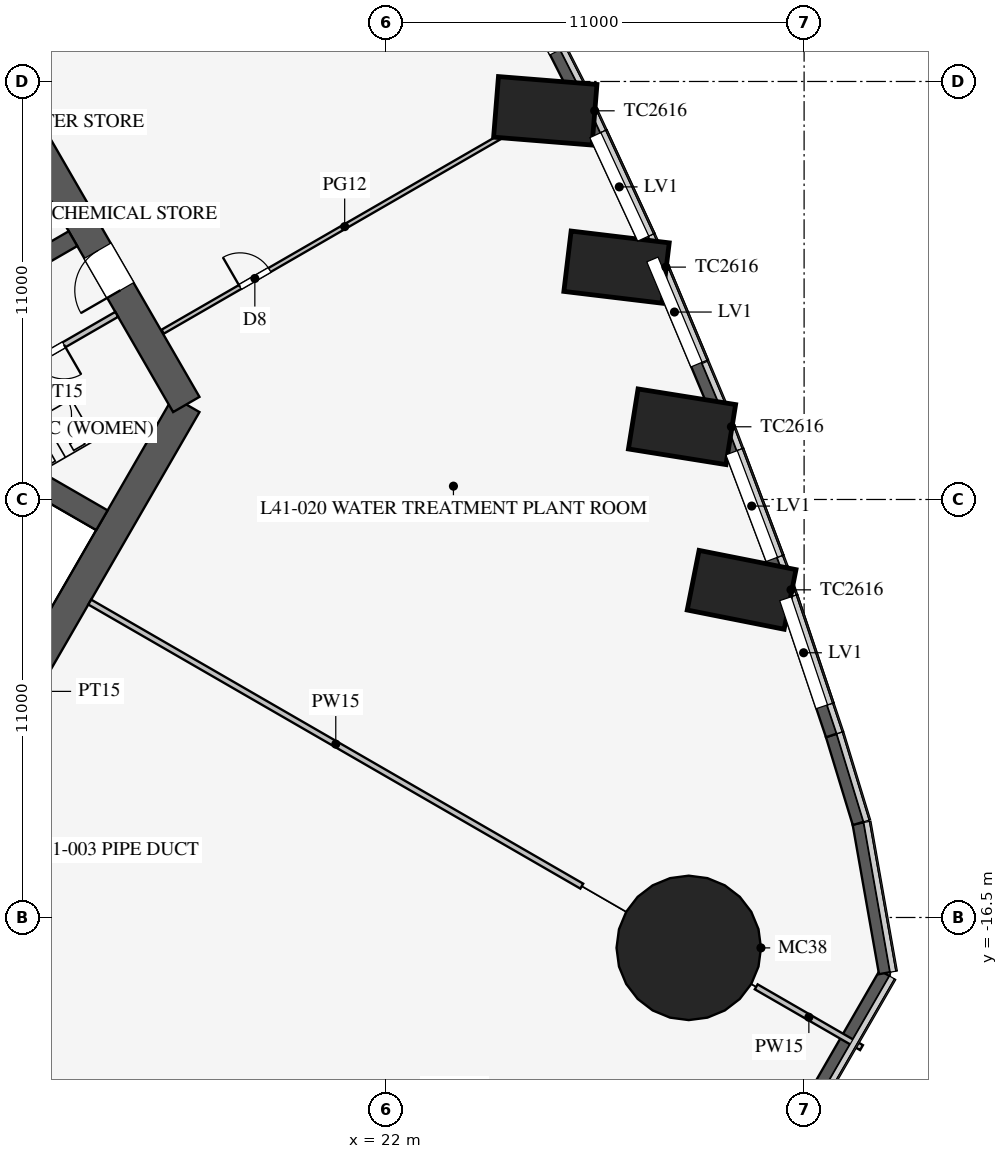
"""IFC4 building model, lengths in metres.
Left out: names, types, materials, properties, quantities, classifications, styles, units other than length and angle.
Written with IfcOpenShell. Run it as: python <this file> out.ifc"""

import sys

from ifc_helpers import new_model, si_unit, direction, frame, frame_2d, origin, origin_2d, place, context, subcontext, project, spatial, polyline, rectangle, circle, outline, extrude, clip, halfspace, element, fill, save


model = new_model("IFC4")
c1 = context("Model", 3, precision=1e-05, world=origin(), true_north=direction((0.0, 1.0)))
c2 = subcontext(c1, "Body", "Model", "MODEL_VIEW")
j1 = project(units=[si_unit("LENGTHUNIT", "METRE"), si_unit("PLANEANGLEUNIT", "RADIAN")], contexts=[c1])
p1 = place(None, origin())
s1 = spatial("IfcSite", under=j1, at=p1, CompositionType="ELEMENT")
p2 = place(p1, origin())
s2 = spatial("IfcBuilding", under=s1, at=p2, CompositionType="ELEMENT")
p3 = place(p2, frame((0.0, 0.0, 178.7)))
s3 = spatial("IfcBuildingStorey", under=s2, at=p3, CompositionType="ELEMENT", Elevation=178.7)
p4 = place(p3, frame((31.682, -7.689, 0.0), z_axis=(-0.259194268696, -0.149669548506, 0.954157931018), x_axis=(-0.329569843621, 0.942330239271, 0.058287548681)))
e1 = element("IfcColumn", 1, at=p4, inside=s3, PredefinedType="COLUMN", context=c2, shape_type="Clipping", body=[
    clip(clip(extrude(rectangle(XDim=2.6, YDim=1.6, at=origin_2d()), origin(), (0.0, 0.0, 1.0), 6.288), halfspace(frame((0.0, 0.0, 0.327), z_axis=(2.1547173570279913e-05, -3.2802665639875003e-06, 0.9999999997624797), x_axis=(0.0, 0.99999999999462, 3.2802665647489825e-06)), True)), halfspace(frame((0.0, 0.0, 5.962), z_axis=(-2.1547173570279913e-05, 3.2802665639875003e-06, -0.9999999997624797), x_axis=(0.0, -0.99999999999462, -3.2802665647489825e-06)), True)),
])
p5 = place(p3, frame((30.077, -3.42, 0.0), z_axis=(-0.231966146532, -0.13391860006, 0.963461216355), x_axis=(-0.36168243427, 0.93133790261, 0.042373669911)))
e2 = element("IfcColumn", 2, at=p5, inside=s3, PredefinedType="COLUMN", context=c2, shape_type="Clipping", body=[
    clip(clip(extrude(rectangle(XDim=2.6, YDim=1.6, at=origin_2d()), origin(), (0.0, 0.0, 1.0), 6.228), halfspace(frame((0.0, 0.0, 0.278), z_axis=(-6.917197328398794e-06, 4.213036003897219e-06, 0.9999999999672015), x_axis=(0.0, 0.9999999999911252, -4.213036003998011e-06)), True)), halfspace(frame((0.0, 0.0, 5.95), z_axis=(6.917197328398794e-06, -4.213036003897219e-06, -0.9999999999672015), x_axis=(0.0, -0.9999999999911252, 4.213036003998011e-06)), True)),
])
p6 = place(p3, frame((28.325, 0.765, 0.0), z_axis=(-0.210679538915, -0.121600535668, 0.969962598046), x_axis=(-0.396030042984, 0.91777825869, 0.029039162011)))
e3 = element("IfcColumn", 3, at=p6, inside=s3, PredefinedType="COLUMN", context=c2, shape_type="Clipping", body=[
    clip(clip(extrude(rectangle(XDim=2.6, YDim=1.6, at=origin_2d()), origin(), (0.0, 0.0, 1.0), 6.186), halfspace(frame((0.0, 0.0, 0.239), z_axis=(-3.0378180671815358e-05, -3.820048547931165e-06, 0.9999999995312867), x_axis=(0.0, 0.9999999999927036, 3.8200485496938e-06)), True)), halfspace(frame((0.0, 0.0, 5.947), z_axis=(3.0378180671815358e-05, 3.820048547931165e-06, -0.9999999995312867), x_axis=(0.0, -0.9999999999927036, -3.8200485496938e-06)), True)),
])
p7 = place(p3, frame((26.43, 4.867, 0.0), z_axis=(-0.195428167391, -0.112817153021, 0.974207432416), x_axis=(-0.430939361595, 0.902200723906, 0.018031095686)))
e4 = element("IfcColumn", 4, at=p7, inside=s3, PredefinedType="COLUMN", context=c2, shape_type="Clipping", body=[
    clip(clip(extrude(rectangle(XDim=2.6, YDim=1.6, at=origin_2d()), origin(), (0.0, 0.0, 1.0), 6.159), halfspace(frame((0.0, 0.0, 0.21), z_axis=(-1.266096880684145e-05, 1.3217046998748039e-05, 0.9999999998325048), x_axis=(0.0, 0.9999999999126549, -1.3217046999807387e-05)), True)), halfspace(frame((0.0, 0.0, 5.949), z_axis=(1.266096880684145e-05, -1.3217046998748039e-05, -0.9999999998325048), x_axis=(0.0, -0.9999999999126549, 1.3217046999807387e-05)), True)),
])
p8 = place(p3, frame((30.311, -17.5, 0.0), z_axis=(-0.273844135475, 0.158114685496, 0.948688112973), x_axis=(-0.50002537861, -0.866010750942, 0.0)))
e5 = element("IfcColumn", 5, at=p8, inside=s3, PredefinedType="COLUMN", context=c2, shape_type="Clipping", body=[
    clip(clip(extrude(circle(Radius=1.9, at=origin_2d()), origin(), (0.0, 0.0, 1.0), 6.324), halfspace(frame((0.0, 0.0, 0.634), z_axis=(9.267167373067098e-06, -1.5226556625558274e-05, 0.9999999998411359), x_axis=(0.0, 0.9999999998840761, 1.5226556626212106e-05)), True)), halfspace(frame((0.0, 0.0, 5.69), z_axis=(-9.267167373067098e-06, 1.5226556625558274e-05, -0.9999999998411359), x_axis=(0.0, -0.9999999998840761, -1.5226556626212106e-05)), True)),
])
p9 = place(p3, frame((10.97, -13.0, 0.0), z_axis=(0.0, 0.0, 1.0), x_axis=(0.499995765644, 0.866027848477, 0.0)))
e6 = element("IfcWall", 6, at=p9, inside=s3, PredefinedType="SHEAR", context=c2, shape_type="SweptSolid", body=[
    extrude(rectangle(XDim=11.547, YDim=0.8, at=frame_2d((5.773, 0.0))), origin(), (0.0, 0.0, 1.0), 6.0),
])
p10 = place(p3, frame((16.743, -3.0, 0.0), z_axis=(0.0, 0.0, 1.0), x_axis=(-0.500002442456, 0.866023993627, 0.0)))
e7 = element("IfcWall", 7, at=p10, inside=s3, PredefinedType="SHEAR", context=c2, shape_type="SweptSolid", body=[
    extrude(rectangle(XDim=21.939, YDim=0.8, at=frame_2d((10.97, 0.0))), origin(), (0.0, 0.0, 1.0), 6.0),
])
p11 = place(p10, frame((17.27, 0.0, 0.0)))
e8 = element("IfcOpeningElement", 8, at=p11, cuts=e7, PredefinedType="OPENING", context=c2, shape_type="SweptSolid", body=[
    extrude(rectangle(XDim=1.2, YDim=2.1, at=frame_2d((0.6, 1.05))), frame((0.0, 0.41, 0.0), z_axis=(0.0, -1.0, 0.0), x_axis=(1.0, 0.0, 0.0)), (0.0, 0.0, 1.0), 0.82),
])
p12 = place(p10, frame((3.47, 0.0, 0.0)))
e9 = element("IfcOpeningElement", 9, at=p12, cuts=e7, PredefinedType="OPENING", context=c2, shape_type="SweptSolid", body=[
    extrude(rectangle(XDim=1.2, YDim=2.1, at=frame_2d((0.6, 1.05))), frame((0.0, 0.41, 0.0), z_axis=(0.0, -1.0, 0.0), x_axis=(1.0, 0.0, 0.0)), (0.0, 0.0, 1.0), 0.82),
])
p13 = place(p3, frame((11.532, 0.076, 0.0), z_axis=(0.0, 0.0, 1.0), x_axis=(0.866005588531, 0.500034319456, 0.0)))
e10 = element("IfcWall", 10, at=p13, inside=s3, PredefinedType="SHEAR", context=c2, shape_type="SweptSolid", body=[
    extrude(rectangle(XDim=2.575, YDim=0.45, at=frame_2d((1.288, 0.0))), origin(), (0.0, 0.0, 1.0), 6.0),
])
p14 = place(p3, frame((6.663, -1.509, 0.0), z_axis=(0.0, 0.0, 1.0), x_axis=(0.866019375473, -0.500010441196, 0.0)))
e11 = element("IfcWall", 11, at=p14, inside=s3, PredefinedType="SHEAR", context=c2, shape_type="SweptSolid", body=[
    extrude(rectangle(XDim=9.075, YDim=0.6, at=frame_2d((4.538, 0.0))), origin(), (0.0, 0.0, 1.0), 6.0),
])
for number, where, z_axis, x_axis in (
    (12, (33.118, -21.431, 0.0), (0.0, 0.0, 1.0), (0.5, 0.866, 0.0)),
    (13, (35.119, -17.966, 0.0), (0.0, 0.0, 1.0), (-0.174, 0.985, 0.0)),
):
    element("IfcWall", number, at=place(p3, frame(where, z_axis=z_axis, x_axis=x_axis)), inside=s3, PredefinedType="SOLIDWALL", context=c2, shape_type="SweptSolid", body=[
        extrude(rectangle(XDim=4.002, YDim=0.3, at=frame_2d((2.001, 0.0))), origin(), (0.0, 0.0, 1.0), 5.8),
    ])
p15 = place(p3, frame((34.424, -14.025, 0.0), z_axis=(0.0, 0.0, 1.0), x_axis=(-0.291639268075, 0.956528377685, 0.0)))
e14 = element("IfcWall", 14, at=p15, inside=s3, PredefinedType="SOLIDWALL", context=c2, shape_type="SweptSolid", body=[
    extrude(rectangle(XDim=2.42, YDim=0.3, at=frame_2d((1.21, 0.0))), origin(), (0.0, 0.0, 1.0), 5.8),
])
p16 = place(p3, frame((33.718, -11.71, 0.0), z_axis=(0.0, 0.0, 1.0), x_axis=(-0.318380687167, 0.947962941279, 0.0)))
e15 = element("IfcWall", 15, at=p16, inside=s3, PredefinedType="SOLIDWALL", context=c2, shape_type="SweptSolid", body=[
    extrude(rectangle(XDim=4.591, YDim=0.3, at=frame_2d((2.295, 0.0))), origin(), (0.0, 0.0, 1.0), 5.8),
])
p17 = place(p16, frame((0.796, 0.0, 3.5)))
e16 = element("IfcOpeningElement", 16, at=p17, cuts=e15, PredefinedType="OPENING", context=c2, shape_type="SweptSolid", body=[
    extrude(rectangle(XDim=3.0, YDim=2.0, at=frame_2d((1.5, 1.0))), frame((0.0, 0.16, 0.0), z_axis=(0.0, -1.0, 0.0), x_axis=(1.0, 0.0, 0.0)), (0.0, 0.0, 1.0), 0.32),
])
p18 = place(p3, frame((32.256, -7.358, 0.0), z_axis=(0.0, 0.0, 1.0), x_axis=(-0.352941426142, 0.935645418795, 0.0)))
e17 = element("IfcWall", 17, at=p18, inside=s3, PredefinedType="SOLIDWALL", context=c2, shape_type="SweptSolid", body=[
    extrude(rectangle(XDim=4.561, YDim=0.3, at=frame_2d((2.28, 0.0))), origin(), (0.0, 0.0, 1.0), 5.8),
])
p19 = place(p18, frame((0.3, 0.0, 3.5)))
e18 = element("IfcOpeningElement", 18, at=p19, cuts=e17, PredefinedType="OPENING", context=c2, shape_type="SweptSolid", body=[
    extrude(rectangle(XDim=3.0, YDim=2.0, at=frame_2d((1.5, 1.0))), frame((0.0, 0.16, 0.0), z_axis=(0.0, -1.0, 0.0), x_axis=(1.0, 0.0, 0.0)), (0.0, 0.0, 1.0), 0.32),
])
p20 = place(p3, frame((30.647, -3.091, 0.0), z_axis=(0.0, 0.0, 1.0), x_axis=(-0.386762112496, 0.922179520667, 0.0)))
e19 = element("IfcWall", 19, at=p20, inside=s3, PredefinedType="SOLIDWALL", context=c2, shape_type="SweptSolid", body=[
    extrude(rectangle(XDim=4.536, YDim=0.3, at=frame_2d((2.268, 0.0))), origin(), (0.0, 0.0, 1.0), 5.8),
])
p21 = place(p20, frame((1.236, 0.0, 3.5)))
e20 = element("IfcOpeningElement", 20, at=p21, cuts=e19, PredefinedType="OPENING", context=c2, shape_type="SweptSolid", body=[
    extrude(rectangle(XDim=3.0, YDim=2.0, at=frame_2d((1.5, 1.0))), frame((0.0, 0.16, 0.0), z_axis=(0.0, -1.0, 0.0), x_axis=(1.0, 0.0, 0.0)), (0.0, 0.0, 1.0), 0.32),
])
p22 = place(p3, frame((28.892, 1.093, 0.0), z_axis=(0.0, 0.0, 1.0), x_axis=(-0.419948870618, 0.907547765171, 0.0)))
e21 = element("IfcWall", 21, at=p22, inside=s3, PredefinedType="SOLIDWALL", context=c2, shape_type="SweptSolid", body=[
    extrude(rectangle(XDim=4.518, YDim=0.3, at=frame_2d((2.259, 0.0))), origin(), (0.0, 0.0, 1.0), 5.8),
])
p23 = place(p22, frame((0.3, 0.0, 3.5)))
e22 = element("IfcOpeningElement", 22, at=p23, cuts=e21, PredefinedType="OPENING", context=c2, shape_type="SweptSolid", body=[
    extrude(rectangle(XDim=3.0, YDim=2.0, at=frame_2d((1.5, 1.0))), frame((0.0, 0.16, 0.0), z_axis=(0.0, -1.0, 0.0), x_axis=(1.0, 0.0, 0.0)), (0.0, 0.0, 1.0), 0.32),
])
p24 = place(p3, frame((26.995, 5.193, 0.0), z_axis=(0.0, 0.0, 1.0), x_axis=(-0.452406735601, 0.891811720927, 0.0)))
e23 = element("IfcWall", 23, at=p24, inside=s3, PredefinedType="SOLIDWALL", context=c2, shape_type="SweptSolid", body=[
    extrude(rectangle(XDim=4.507, YDim=0.3, at=frame_2d((2.253, 0.0))), origin(), (0.0, 0.0, 1.0), 5.8),
])
p25 = place(p24, frame((1.207, 0.0, 3.5)))
e24 = element("IfcOpeningElement", 24, at=p25, cuts=e23, PredefinedType="OPENING", context=c2, shape_type="SweptSolid", body=[
    extrude(rectangle(XDim=3.0, YDim=2.0, at=frame_2d((1.5, 1.0))), frame((0.0, 0.16, 0.0), z_axis=(0.0, -1.0, 0.0), x_axis=(1.0, 0.0, 0.0)), (0.0, 0.0, 1.0), 0.32),
])
p26 = place(p3, frame((10.495, -3.178, 0.0), z_axis=(0.0, 0.0, 1.0), x_axis=(0.86602216432, 0.500005610874, 0.0)))
e25 = element("IfcWall", 25, at=p26, inside=s3, PredefinedType="PARTITIONING", context=c2, shape_type="SweptSolid", body=[
    extrude(rectangle(XDim=5.1, YDim=0.15, at=frame_2d((2.55, 0.0))), origin(), (0.0, 0.0, 1.0), 5.8),
])
p27 = place(p26, frame((2.6, 0.0, 0.0)))
e26 = element("IfcOpeningElement", 26, at=p27, cuts=e25, PredefinedType="OPENING", context=c2, shape_type="SweptSolid", body=[
    extrude(rectangle(XDim=0.9, YDim=2.1, at=frame_2d((0.45, 1.05))), frame((0.0, 0.085, 0.0), z_axis=(0.0, -1.0, 0.0), x_axis=(1.0, 0.0, 0.0)), (0.0, 0.0, 1.0), 0.17),
])
p28 = place(p3, frame((14.203, -8.2, 0.0), z_axis=(0.0, 0.0, 1.0), x_axis=(0.866021600284, -0.500006587798, 0.0)))
e27 = element("IfcWall", 27, at=p28, inside=s3, PredefinedType="PARTITIONING", context=c2, shape_type="SweptSolid", body=[
    extrude(rectangle(XDim=14.95, YDim=0.15, at=frame_2d((7.475, 0.0))), origin(), (0.0, 0.0, 1.0), 4.2),
])
p29 = place(p3, frame((31.74, -18.325, 0.0), z_axis=(0.0, 0.0, 1.0), x_axis=(0.866036909293, -0.499980071345, 0.0)))
e28 = element("IfcWall", 28, at=p29, inside=s3, PredefinedType="PARTITIONING", context=c2, shape_type="SweptSolid", body=[
    extrude(rectangle(XDim=3.199, YDim=0.15, at=frame_2d((1.6, 0.0))), origin(), (0.0, 0.0, 1.0), 5.8),
])
p30 = place(p3, frame((25.122, 4.112, 0.0), z_axis=(0.0, 0.0, 1.0), x_axis=(0.866002566612, 0.500039553057, 0.0)))
e29 = element("IfcWall", 29, at=p30, inside=s3, PredefinedType="PARTITIONING", context=c2, shape_type="SweptSolid", body=[
    extrude(outline(polyline([(0.0, 0.0), (0.667, 0.0), (0.667, 0.05), (0.0, 2.9), (0.0, 0.0)])), frame((0.0, 0.06, 0.0), z_axis=(0.0, -1.0, 0.0), x_axis=(1.0, 0.0, 0.0)), (0.0, 0.0, 1.0), 0.12),
])
p31 = place(p3, frame((16.122, -1.084, 0.0), z_axis=(0.0, 0.0, 1.0), x_axis=(0.866025583565, 0.49999968861, 0.0)))
e30 = element("IfcWall", 30, at=p31, inside=s3, PredefinedType="PARTITIONING", context=c2, shape_type="SweptSolid", body=[
    extrude(rectangle(XDim=10.393, YDim=0.12, at=frame_2d((5.196, 0.0))), origin(), (0.0, 0.0, 1.0), 2.9),
])
p32 = place(p31, frame((2.35, 0.0, 0.0)))
e31 = element("IfcOpeningElement", 31, at=p32, cuts=e30, PredefinedType="OPENING", context=c2, shape_type="SweptSolid", body=[
    extrude(rectangle(XDim=0.9, YDim=2.1, at=frame_2d((0.45, 1.05))), frame((0.0, 0.07, 0.0), z_axis=(0.0, -1.0, 0.0), x_axis=(1.0, 0.0, 0.0)), (0.0, 0.0, 1.0), 0.14),
])
p33 = place(p17, origin())
e32 = element("IfcWindow", 32, at=p33, inside=s3, PartitioningType="SINGLE_PANEL", PredefinedType="USERDEFINED", context=c2, shape_type="SweptSolid", body=[
    extrude(rectangle(XDim=3.0, YDim=2.0, at=frame_2d((1.5, 1.0))), frame((0.0, 0.03, 0.0), z_axis=(0.0, -1.0, 0.0), x_axis=(1.0, 0.0, 0.0)), (0.0, 0.0, 1.0), 0.06),
])
fill(e16, e32)
p34 = place(p19, origin())
e33 = element("IfcWindow", 33, at=p34, inside=s3, PartitioningType="SINGLE_PANEL", PredefinedType="USERDEFINED", context=c2, shape_type="SweptSolid", body=[
    extrude(rectangle(XDim=3.0, YDim=2.0, at=frame_2d((1.5, 1.0))), frame((0.0, 0.03, 0.0), z_axis=(0.0, -1.0, 0.0), x_axis=(1.0, 0.0, 0.0)), (0.0, 0.0, 1.0), 0.06),
])
fill(e18, e33)
p35 = place(p21, origin())
e34 = element("IfcWindow", 34, at=p35, inside=s3, PartitioningType="SINGLE_PANEL", PredefinedType="USERDEFINED", context=c2, shape_type="SweptSolid", body=[
    extrude(rectangle(XDim=3.0, YDim=2.0, at=frame_2d((1.5, 1.0))), frame((0.0, 0.03, 0.0), z_axis=(0.0, -1.0, 0.0), x_axis=(1.0, 0.0, 0.0)), (0.0, 0.0, 1.0), 0.06),
])
fill(e20, e34)
p36 = place(p23, origin())
e35 = element("IfcWindow", 35, at=p36, inside=s3, PartitioningType="SINGLE_PANEL", PredefinedType="USERDEFINED", context=c2, shape_type="SweptSolid", body=[
    extrude(rectangle(XDim=3.0, YDim=2.0, at=frame_2d((1.5, 1.0))), frame((0.0, 0.03, 0.0), z_axis=(0.0, -1.0, 0.0), x_axis=(1.0, 0.0, 0.0)), (0.0, 0.0, 1.0), 0.06),
])
fill(e22, e35)
p37 = place(p25, origin())
e36 = element("IfcWindow", 36, at=p37, inside=s3, PartitioningType="SINGLE_PANEL", PredefinedType="USERDEFINED", context=c2, shape_type="SweptSolid", body=[
    extrude(rectangle(XDim=3.0, YDim=2.0, at=frame_2d((1.5, 1.0))), frame((0.0, 0.03, 0.0), z_axis=(0.0, -1.0, 0.0), x_axis=(1.0, 0.0, 0.0)), (0.0, 0.0, 1.0), 0.06),
])
fill(e24, e36)
p38 = place(p27, frame((0.9, 0.0, 0.0), z_axis=(0.0, 0.0, 1.0), x_axis=(-1.0, 0.0, 0.0)))
e37 = element("IfcDoor", 37, at=p38, inside=s3, OperationType="SINGLE_SWING_LEFT", PredefinedType="DOOR", context=c2, shape_type="SweptSolid", body=[
    extrude(rectangle(XDim=0.9, YDim=2.1, at=frame_2d((0.45, 1.05))), frame((0.0, 0.025, 0.0), z_axis=(0.0, -1.0, 0.0), x_axis=(1.0, 0.0, 0.0)), (0.0, 0.0, 1.0), 0.05),
])
fill(e26, e37)
p39 = place(p12, origin())
e38 = element("IfcDoor", 38, at=p39, inside=s3, OperationType="SINGLE_SWING_LEFT", PredefinedType="DOOR", context=c2, shape_type="SweptSolid", body=[
    extrude(rectangle(XDim=1.2, YDim=2.1, at=frame_2d((0.6, 1.05))), frame((0.0, 0.025, 0.0), z_axis=(0.0, -1.0, 0.0), x_axis=(1.0, 0.0, 0.0)), (0.0, 0.0, 1.0), 0.05),
])
fill(e9, e38)
p40 = place(p32, origin())
e39 = element("IfcDoor", 39, at=p40, inside=s3, OperationType="SINGLE_SWING_LEFT", PredefinedType="DOOR", context=c2, shape_type="SweptSolid", body=[
    extrude(rectangle(XDim=0.9, YDim=2.1, at=frame_2d((0.45, 1.05))), frame((0.0, 0.025, 0.0), z_axis=(0.0, -1.0, 0.0), x_axis=(1.0, 0.0, 0.0)), (0.0, 0.0, 1.0), 0.05),
])
fill(e31, e39)
save(model, sys.argv[1])
